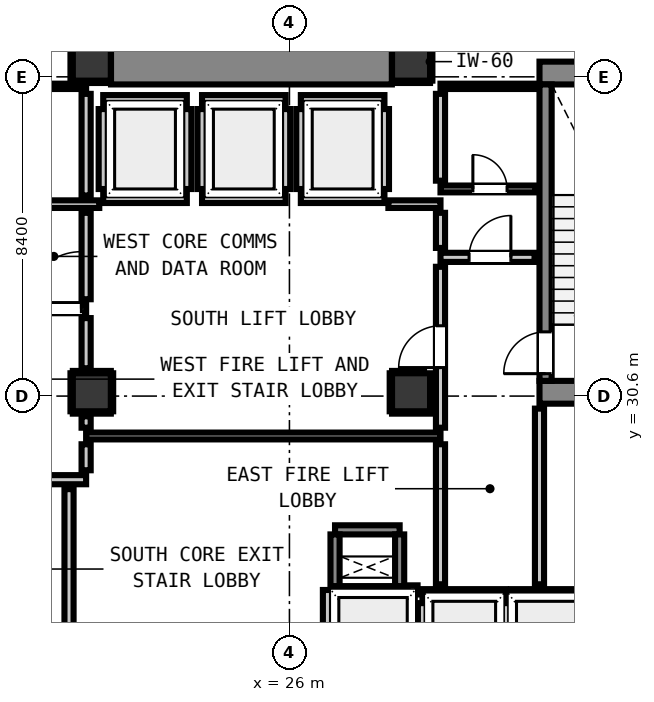
"""IFC4 building model, lengths in metres.
Left out: names, types, materials, properties, quantities, classifications, styles, units other than length and angle.
Written with IfcOpenShell. Run it as: python <this file> out.ifc"""

import sys

from ifc_helpers import new_model, si_unit, direction, frame, frame_2d, origin, origin_2d, place, context, subcontext, project, spatial, rectangle, extrude, element, fill, save


model = new_model("IFC4")
c1 = context("Model", 3, precision=1e-05, world=origin(), true_north=direction((0.0, 1.0)))
c2 = subcontext(c1, "Body", "Model", "MODEL_VIEW")
j1 = project(units=[si_unit("LENGTHUNIT", "METRE"), si_unit("PLANEANGLEUNIT", "RADIAN")], contexts=[c1])
p1 = place(None, origin())
s1 = spatial("IfcSite", under=j1, at=p1, CompositionType="ELEMENT")
p2 = place(p1, origin())
s2 = spatial("IfcBuilding", under=s1, at=p2, CompositionType="ELEMENT")
p3 = place(p2, frame((0.0, 0.0, 5.2)))
s3 = spatial("IfcBuildingStorey", under=s2, at=p3, CompositionType="ELEMENT", Elevation=5.2)
for number, where, z_axis, x_axis in (
    (1, (20.8, 39.4, 0.0), (0.0, 0.0, 1.0), (1.0, 0.0, 0.0)),
    (2, (29.2, 39.4, 0.0), (0.0, 0.0, 1.0), (1.0, 0.0, 0.0)),
):
    element("IfcColumn", number, at=place(p3, frame(where, z_axis=z_axis, x_axis=x_axis)), inside=s3, PredefinedType="COLUMN", context=c2, shape_type="SweptSolid", body=[
        extrude(rectangle(XDim=1.0, YDim=1.0, at=origin_2d()), origin(), (0.0, 0.0, 1.0), 4.2),
    ])
p4 = place(p3, frame((32.58, 39.1, 0.0), z_axis=(0.0, 0.0, 1.0), x_axis=(1.0, 0.0, 0.0)))
e3 = element("IfcWall", 3, at=p4, inside=s3, PredefinedType="SHEAR", context=c2, shape_type="SweptSolid", body=[
    extrude(rectangle(XDim=4.08, YDim=0.6, at=frame_2d((2.04, 0.0))), origin(), (0.0, 0.0, 1.0), 4.2),
])
p5 = place(p3, frame((32.58, 30.7, 0.0), z_axis=(0.0, 0.0, 1.0), x_axis=(1.0, 0.0, 0.0)))
e4 = element("IfcWall", 4, at=p5, inside=s3, PredefinedType="SHEAR", context=c2, shape_type="SweptSolid", body=[
    extrude(rectangle(XDim=3.415, YDim=0.6, at=frame_2d((1.708, 0.0))), origin(), (0.0, 0.0, 1.0), 4.2),
])
p6 = place(p3, frame((21.305, 39.4, 0.0), z_axis=(0.0, 0.0, 1.0), x_axis=(1.0, 0.0, 0.0)))
e5 = element("IfcWall", 5, at=p6, inside=s3, PredefinedType="SHEAR", context=c2, shape_type="SweptSolid", body=[
    extrude(rectangle(XDim=7.39, YDim=1.2, at=frame_2d((3.695, 0.0))), origin(), (0.0, 0.0, 1.0), 4.2),
])
p7 = place(p3, frame((32.74, 31.0, 0.0), z_axis=(0.0, 0.0, 1.0), x_axis=(0.0, 1.0, 0.0)))
e6 = element("IfcWall", 6, at=p7, inside=s3, PredefinedType="SHEAR", context=c2, shape_type="SweptSolid", body=[
    extrude(rectangle(XDim=7.8, YDim=0.32, at=frame_2d((3.9, 0.0))), origin(), (0.0, 0.0, 1.0), 4.2),
])
p8 = place(p7, frame((0.19, 0.0, 0.0)))
e7 = element("IfcOpeningElement", 7, at=p8, cuts=e6, PredefinedType="OPENING", context=c2, shape_type="SweptSolid", body=[
    extrude(rectangle(XDim=1.1, YDim=2.15, at=frame_2d((0.55, 1.075))), frame((0.0, 0.17, 0.0), z_axis=(0.0, -1.0, 0.0), x_axis=(1.0, 0.0, 0.0)), (0.0, 0.0, 1.0), 0.34),
])
for number, where, z_axis, x_axis in (
    (8, (27.2, 25.48, 0.0), (0.0, 0.0, 1.0), (1.0, 0.0, 0.0)),
    (9, (27.2, 27.08, 0.0), (0.0, 0.0, 1.0), (1.0, 0.0, 0.0)),
):
    element("IfcWall", number, at=place(p3, frame(where, z_axis=z_axis, x_axis=x_axis)), inside=s3, PredefinedType="SHEAR", context=c2, shape_type="SweptSolid", body=[
        extrude(rectangle(XDim=1.7, YDim=0.24, at=frame_2d((0.85, 0.0))), origin(), (0.0, 0.0, 1.0), 4.2),
    ])
for number, where, z_axis, x_axis in (
    (10, (27.2, 25.6, 0.0), (0.0, 0.0, 1.0), (0.0, 1.0, 0.0)),
    (11, (28.9, 25.6, 0.0), (0.0, 0.0, 1.0), (0.0, 1.0, 0.0)),
):
    element("IfcWall", number, at=place(p3, frame(where, z_axis=z_axis, x_axis=x_axis)), inside=s3, PredefinedType="SHEAR", context=c2, shape_type="SweptSolid", body=[
        extrude(rectangle(XDim=1.36, YDim=0.24, at=frame_2d((0.68, 0.0))), origin(), (0.0, 0.0, 1.0), 4.2),
    ])
for number, where, z_axis, x_axis in (
    (12, (20.8, 30.7, 0.0), (0.0, 0.0, 1.0), (1.0, 0.0, 0.0)),
    (13, (29.2, 30.7, 0.0), (0.0, 0.0, 1.0), (1.0, 0.0, 0.0)),
):
    element("IfcColumn", number, at=place(p3, frame(where, z_axis=z_axis, x_axis=x_axis)), inside=s3, PredefinedType="COLUMN", context=c2, shape_type="SweptSolid", body=[
        extrude(rectangle(XDim=1.0, YDim=1.0, at=origin_2d()), origin(), (0.0, 0.0, 1.0), 4.2),
    ])
for number, where, z_axis, x_axis in (
    (14, (21.1, 35.8, 0.0), (0.0, 0.0, 1.0), (1.0, 0.0, 0.0)),
    (15, (21.1, 38.4, 0.0), (0.0, 0.0, 1.0), (1.0, 0.0, 0.0)),
):
    element("IfcWall", number, at=place(p3, frame(where, z_axis=z_axis, x_axis=x_axis)), inside=s3, PredefinedType="PARTITIONING", context=c2, shape_type="SweptSolid", body=[
        extrude(rectangle(XDim=2.2, YDim=0.24, at=frame_2d((1.1, 0.0))), origin(), (0.0, 0.0, 1.0), 3.92),
    ])
p9 = place(p3, frame((21.1, 36.048, 0.0), z_axis=(0.0, 0.0, 1.0), x_axis=(0.0, 1.0, 0.0)))
e16 = element("IfcWall", 16, at=p9, inside=s3, PredefinedType="PARTITIONING", context=c2, shape_type="SweptSolid", body=[
    extrude(rectangle(XDim=2.104, YDim=0.24, at=frame_2d((1.052, 0.0))), origin(), (0.0, 0.0, 1.0), 2.955),
])
p10 = place(p3, frame((23.3, 36.048, 0.0), z_axis=(0.0, 0.0, 1.0), x_axis=(0.0, 1.0, 0.0)))
e17 = element("IfcWall", 17, at=p10, inside=s3, PredefinedType="PARTITIONING", context=c2, shape_type="SweptSolid", body=[
    extrude(rectangle(XDim=2.104, YDim=0.24, at=frame_2d((1.052, 0.0))), origin(), (0.0, 0.0, 1.0), 3.92),
])
for number, where, z_axis, x_axis in (
    (18, (23.7, 35.8, 0.0), (0.0, 0.0, 1.0), (1.0, 0.0, 0.0)),
    (19, (23.7, 38.4, 0.0), (0.0, 0.0, 1.0), (1.0, 0.0, 0.0)),
):
    element("IfcWall", number, at=place(p3, frame(where, z_axis=z_axis, x_axis=x_axis)), inside=s3, PredefinedType="PARTITIONING", context=c2, shape_type="SweptSolid", body=[
        extrude(rectangle(XDim=2.2, YDim=0.24, at=frame_2d((1.1, 0.0))), origin(), (0.0, 0.0, 1.0), 3.92),
    ])
for number, where, z_axis, x_axis in (
    (20, (23.7, 36.048, 0.0), (0.0, 0.0, 1.0), (0.0, 1.0, 0.0)),
    (21, (25.9, 36.048, 0.0), (0.0, 0.0, 1.0), (0.0, 1.0, 0.0)),
):
    element("IfcWall", number, at=place(p3, frame(where, z_axis=z_axis, x_axis=x_axis)), inside=s3, PredefinedType="PARTITIONING", context=c2, shape_type="SweptSolid", body=[
        extrude(rectangle(XDim=2.104, YDim=0.24, at=frame_2d((1.052, 0.0))), origin(), (0.0, 0.0, 1.0), 3.92),
    ])
for number, where, z_axis, x_axis in (
    (22, (26.3, 35.8, 0.0), (0.0, 0.0, 1.0), (1.0, 0.0, 0.0)),
    (23, (26.3, 38.4, 0.0), (0.0, 0.0, 1.0), (1.0, 0.0, 0.0)),
):
    element("IfcWall", number, at=place(p3, frame(where, z_axis=z_axis, x_axis=x_axis)), inside=s3, PredefinedType="PARTITIONING", context=c2, shape_type="SweptSolid", body=[
        extrude(rectangle(XDim=2.2, YDim=0.24, at=frame_2d((1.1, 0.0))), origin(), (0.0, 0.0, 1.0), 3.92),
    ])
for number, where, z_axis, x_axis in (
    (24, (26.3, 36.048, 0.0), (0.0, 0.0, 1.0), (0.0, 1.0, 0.0)),
    (25, (28.5, 36.048, 0.0), (0.0, 0.0, 1.0), (0.0, 1.0, 0.0)),
):
    element("IfcWall", number, at=place(p3, frame(where, z_axis=z_axis, x_axis=x_axis)), inside=s3, PredefinedType="PARTITIONING", context=c2, shape_type="SweptSolid", body=[
        extrude(rectangle(XDim=2.104, YDim=0.24, at=frame_2d((1.052, 0.0))), origin(), (0.0, 0.0, 1.0), 3.92),
    ])
p11 = place(p3, frame((29.5, 25.4, 0.0), z_axis=(0.0, 0.0, 1.0), x_axis=(1.0, 0.0, 0.0)))
e26 = element("IfcWall", 26, at=p11, inside=s3, PredefinedType="PARTITIONING", context=c2, shape_type="SweptSolid", body=[
    extrude(rectangle(XDim=2.2, YDim=0.24, at=frame_2d((1.1, 0.0))), origin(), (0.0, 0.0, 1.0), 3.92),
])
p12 = place(p3, frame((29.5, 22.632, 0.0), z_axis=(0.0, 0.0, 1.0), x_axis=(0.0, 1.0, 0.0)))
e27 = element("IfcWall", 27, at=p12, inside=s3, PredefinedType="PARTITIONING", context=c2, shape_type="SweptSolid", body=[
    extrude(rectangle(XDim=2.52, YDim=0.24, at=frame_2d((1.26, 0.0))), origin(), (0.0, 0.0, 1.0), 2.955),
])
p13 = place(p3, frame((31.7, 22.73, 0.0), z_axis=(0.0, 0.0, 1.0), x_axis=(0.0, 1.0, 0.0)))
e28 = element("IfcWall", 28, at=p13, inside=s3, PredefinedType="PARTITIONING", context=c2, shape_type="SweptSolid", body=[
    extrude(rectangle(XDim=2.422, YDim=0.24, at=frame_2d((1.211, 0.0))), origin(), (0.0, 0.0, 1.0), 3.92),
])
p14 = place(p3, frame((31.828, 25.4, 0.0), z_axis=(0.0, 0.0, 1.0), x_axis=(1.0, 0.0, 0.0)))
e29 = element("IfcWall", 29, at=p14, inside=s3, PredefinedType="PARTITIONING", context=c2, shape_type="SweptSolid", body=[
    extrude(rectangle(XDim=2.072, YDim=0.24, at=frame_2d((1.036, 0.0))), origin(), (0.0, 0.0, 1.0), 3.92),
])
p15 = place(p3, frame((29.103, 25.5, 0.0), z_axis=(0.0, 0.0, 1.0), x_axis=(1.0, 0.0, 0.0)))
e30 = element("IfcWall", 30, at=p15, inside=s3, PredefinedType="PARTITIONING", context=c2, shape_type="SweptSolid", body=[
    extrude(rectangle(XDim=0.269, YDim=0.24, at=frame_2d((0.135, 0.0))), origin(), (0.0, 0.0, 1.0), 3.92),
])
p16 = place(p3, frame((27.0, 22.73, 0.0), z_axis=(0.0, 0.0, 1.0), x_axis=(0.0, 1.0, 0.0)))
e31 = element("IfcWall", 31, at=p16, inside=s3, PredefinedType="PARTITIONING", context=c2, shape_type="SweptSolid", body=[
    extrude(rectangle(XDim=2.768, YDim=0.24, at=frame_2d((1.384, 0.0))), origin(), (0.0, 0.0, 1.0), 3.92),
])
p17 = place(p3, frame((17.45, 28.4, 0.0), z_axis=(0.0, 0.0, 1.0), x_axis=(1.0, 0.0, 0.0)))
e32 = element("IfcWall", 32, at=p17, inside=s3, PredefinedType="PARTITIONING", context=c2, shape_type="SweptSolid", body=[
    extrude(rectangle(XDim=3.2, YDim=0.24, at=frame_2d((1.6, 0.0))), origin(), (0.0, 0.0, 1.0), 3.92),
])
p18 = place(p17, frame((0.784, 0.0, 0.0)))
e33 = element("IfcOpeningElement", 33, at=p18, cuts=e32, PredefinedType="OPENING", context=c2, shape_type="SweptSolid", body=[
    extrude(rectangle(XDim=1.1, YDim=2.15, at=frame_2d((0.55, 1.075))), frame((0.0, 0.13, 0.0), z_axis=(0.0, -1.0, 0.0), x_axis=(1.0, 0.0, 0.0)), (0.0, 0.0, 1.0), 0.26),
])
p19 = place(p3, frame((17.45, 32.9, 0.0), z_axis=(0.0, 0.0, 1.0), x_axis=(1.0, 0.0, 0.0)))
e34 = element("IfcWall", 34, at=p19, inside=s3, PredefinedType="PARTITIONING", context=c2, shape_type="SweptSolid", body=[
    extrude(rectangle(XDim=3.2, YDim=0.24, at=frame_2d((1.6, 0.0))), origin(), (0.0, 0.0, 1.0), 3.92),
])
p20 = place(p19, frame((0.159, 0.0, 0.0)))
e35 = element("IfcOpeningElement", 35, at=p20, cuts=e34, PredefinedType="OPENING", context=c2, shape_type="SweptSolid", body=[
    extrude(rectangle(XDim=1.1, YDim=2.15, at=frame_2d((0.55, 1.075))), frame((0.0, 0.13, 0.0), z_axis=(0.0, -1.0, 0.0), x_axis=(1.0, 0.0, 0.0)), (0.0, 0.0, 1.0), 0.26),
])
p21 = place(p19, frame((1.576, 0.0, 0.0)))
e36 = element("IfcOpeningElement", 36, at=p21, cuts=e34, PredefinedType="OPENING", context=c2, shape_type="SweptSolid", body=[
    extrude(rectangle(XDim=1.5, YDim=2.15, at=frame_2d((0.75, 1.075))), frame((0.0, 0.13, 0.0), z_axis=(0.0, -1.0, 0.0), x_axis=(1.0, 0.0, 0.0)), (0.0, 0.0, 1.0), 0.26),
])
p22 = place(p3, frame((29.975, 34.25, 0.0), z_axis=(0.0, 0.0, 1.0), x_axis=(1.0, 0.0, 0.0)))
e37 = element("IfcWall", 37, at=p22, inside=s3, PredefinedType="PARTITIONING", context=c2, shape_type="SweptSolid", body=[
    extrude(rectangle(XDim=2.475, YDim=0.24, at=frame_2d((1.237, 0.0))), origin(), (0.0, 0.0, 1.0), 3.92),
])
p23 = place(p22, frame((0.752, 0.0, 0.0)))
e38 = element("IfcOpeningElement", 38, at=p23, cuts=e37, PredefinedType="OPENING", context=c2, shape_type="SweptSolid", body=[
    extrude(rectangle(XDim=1.1, YDim=2.15, at=frame_2d((0.55, 1.075))), frame((0.0, 0.13, 0.0), z_axis=(0.0, -1.0, 0.0), x_axis=(1.0, 0.0, 0.0)), (0.0, 0.0, 1.0), 0.26),
])
p24 = place(p3, frame((18.95, 35.65, 0.0), z_axis=(0.0, 0.0, 1.0), x_axis=(1.0, 0.0, 0.0)))
e39 = element("IfcWall", 39, at=p24, inside=s3, PredefinedType="PARTITIONING", context=c2, shape_type="SweptSolid", body=[
    extrude(rectangle(XDim=2.046, YDim=0.2, at=frame_2d((1.023, 0.0))), origin(), (0.0, 0.0, 1.0), 3.92),
])
p25 = place(p3, frame((28.604, 35.65, 0.0), z_axis=(0.0, 0.0, 1.0), x_axis=(1.0, 0.0, 0.0)))
e40 = element("IfcWall", 40, at=p25, inside=s3, PredefinedType="PARTITIONING", context=c2, shape_type="SweptSolid", body=[
    extrude(rectangle(XDim=1.371, YDim=0.2, at=frame_2d((0.686, 0.0))), origin(), (0.0, 0.0, 1.0), 3.92),
])
p26 = place(p3, frame((20.65, 29.55, 0.0), z_axis=(0.0, 0.0, 1.0), x_axis=(1.0, 0.0, 0.0)))
e41 = element("IfcWall", 41, at=p26, inside=s3, PredefinedType="PARTITIONING", context=c2, shape_type="SweptSolid", body=[
    extrude(rectangle(XDim=9.325, YDim=0.18, at=frame_2d((4.663, 0.0))), origin(), (0.0, 0.0, 1.0), 3.92),
])
p27 = place(p3, frame((29.975, 36.05, 0.0), z_axis=(0.0, 0.0, 1.0), x_axis=(1.0, 0.0, 0.0)))
e42 = element("IfcWall", 42, at=p27, inside=s3, PredefinedType="PARTITIONING", context=c2, shape_type="SweptSolid", body=[
    extrude(rectangle(XDim=2.505, YDim=0.18, at=frame_2d((1.252, 0.0))), origin(), (0.0, 0.0, 1.0), 3.92),
])
p28 = place(p27, frame((0.852, 0.0, 0.0)))
e43 = element("IfcOpeningElement", 43, at=p28, cuts=e42, PredefinedType="OPENING", context=c2, shape_type="SweptSolid", body=[
    extrude(rectangle(XDim=0.9, YDim=2.1, at=frame_2d((0.45, 1.05))), frame((0.0, 0.1, 0.0), z_axis=(0.0, -1.0, 0.0), x_axis=(1.0, 0.0, 0.0)), (0.0, 0.0, 1.0), 0.2),
])
p29 = place(p3, frame((18.95, 38.75, 0.0), z_axis=(0.0, 0.0, 1.0), x_axis=(1.0, 0.0, 0.0)))
e44 = element("IfcWall", 44, at=p29, inside=s3, PredefinedType="PARTITIONING", context=c2, shape_type="SweptSolid", body=[
    extrude(rectangle(XDim=1.7, YDim=0.14, at=frame_2d((0.85, 0.0))), origin(), (0.0, 0.0, 1.0), 3.92),
])
p30 = place(p3, frame((29.975, 38.75, 0.0), z_axis=(0.0, 0.0, 1.0), x_axis=(1.0, 0.0, 0.0)))
e45 = element("IfcWall", 45, at=p30, inside=s3, PredefinedType="PARTITIONING", context=c2, shape_type="SweptSolid", body=[
    extrude(rectangle(XDim=2.525, YDim=0.14, at=frame_2d((1.262, 0.0))), origin(), (0.0, 0.0, 1.0), 3.92),
])
p31 = place(p3, frame((20.2, 22.586, 0.0), z_axis=(0.0, 0.0, 1.0), x_axis=(0.0, 1.0, 0.0)))
e46 = element("IfcWall", 46, at=p31, inside=s3, PredefinedType="PARTITIONING", context=c2, shape_type="SweptSolid", body=[
    extrude(rectangle(XDim=5.566, YDim=0.24, at=frame_2d((2.783, 0.0))), origin(), (0.0, 0.0, 1.0), 3.92),
])
p32 = place(p3, frame((20.65, 28.648, 0.0), z_axis=(0.0, 0.0, 1.0), x_axis=(0.0, 1.0, 0.0)))
e47 = element("IfcWall", 47, at=p32, inside=s3, PredefinedType="PARTITIONING", context=c2, shape_type="SweptSolid", body=[
    extrude(rectangle(XDim=0.684, YDim=0.24, at=frame_2d((0.342, 0.0))), origin(), (0.0, 0.0, 1.0), 2.955),
])
p33 = place(p3, frame((20.65, 29.768, 0.0), z_axis=(0.0, 0.0, 1.0), x_axis=(0.0, 1.0, 0.0)))
e48 = element("IfcWall", 48, at=p33, inside=s3, PredefinedType="PARTITIONING", context=c2, shape_type="SweptSolid", body=[
    extrude(rectangle(XDim=0.3, YDim=0.24, at=frame_2d((0.15, 0.0))), origin(), (0.0, 0.0, 1.0), 2.955),
])
p34 = place(p3, frame((20.65, 31.332, 0.0), z_axis=(0.0, 0.0, 1.0), x_axis=(0.0, 1.0, 0.0)))
e49 = element("IfcWall", 49, at=p34, inside=s3, PredefinedType="PARTITIONING", context=c2, shape_type="SweptSolid", body=[
    extrude(rectangle(XDim=1.32, YDim=0.24, at=frame_2d((0.66, 0.0))), origin(), (0.0, 0.0, 1.0), 2.955),
])
p35 = place(p3, frame((20.65, 33.148, 0.0), z_axis=(0.0, 0.0, 1.0), x_axis=(0.0, 1.0, 0.0)))
e50 = element("IfcWall", 50, at=p35, inside=s3, PredefinedType="PARTITIONING", context=c2, shape_type="SweptSolid", body=[
    extrude(rectangle(XDim=2.274, YDim=0.24, at=frame_2d((1.137, 0.0))), origin(), (0.0, 0.0, 1.0), 2.955),
])
p36 = place(p3, frame((20.65, 35.878, 0.0), z_axis=(0.0, 0.0, 1.0), x_axis=(0.0, 1.0, 0.0)))
e51 = element("IfcWall", 51, at=p36, inside=s3, PredefinedType="PARTITIONING", context=c2, shape_type="SweptSolid", body=[
    extrude(rectangle(XDim=2.674, YDim=0.24, at=frame_2d((1.337, 0.0))), origin(), (0.0, 0.0, 1.0), 2.955),
])
p37 = place(p3, frame((29.975, 25.648, 0.0), z_axis=(0.0, 0.0, 1.0), x_axis=(0.0, 1.0, 0.0)))
e52 = element("IfcWall", 52, at=p37, inside=s3, PredefinedType="PARTITIONING", context=c2, shape_type="SweptSolid", body=[
    extrude(rectangle(XDim=3.684, YDim=0.24, at=frame_2d((1.842, 0.0))), origin(), (0.0, 0.0, 1.0), 3.92),
])
p38 = place(p3, frame((29.975, 29.768, 0.0), z_axis=(0.0, 0.0, 1.0), x_axis=(0.0, 1.0, 0.0)))
e53 = element("IfcWall", 53, at=p38, inside=s3, PredefinedType="PARTITIONING", context=c2, shape_type="SweptSolid", body=[
    extrude(rectangle(XDim=4.234, YDim=0.24, at=frame_2d((2.117, 0.0))), origin(), (0.0, 0.0, 1.0), 3.92),
])
p39 = place(p38, frame((1.582, 0.0, 0.0)))
e54 = element("IfcOpeningElement", 54, at=p39, cuts=e53, PredefinedType="OPENING", context=c2, shape_type="SweptSolid", body=[
    extrude(rectangle(XDim=1.1, YDim=2.15, at=frame_2d((0.55, 1.075))), frame((0.0, 0.13, 0.0), z_axis=(0.0, -1.0, 0.0), x_axis=(1.0, 0.0, 0.0)), (0.0, 0.0, 1.0), 0.26),
])
p40 = place(p3, frame((29.975, 34.498, 0.0), z_axis=(0.0, 0.0, 1.0), x_axis=(0.0, 1.0, 0.0)))
e55 = element("IfcWall", 55, at=p40, inside=s3, PredefinedType="PARTITIONING", context=c2, shape_type="SweptSolid", body=[
    extrude(rectangle(XDim=0.924, YDim=0.24, at=frame_2d((0.462, 0.0))), origin(), (0.0, 0.0, 1.0), 3.92),
])
p41 = place(p3, frame((29.975, 36.268, 0.0), z_axis=(0.0, 0.0, 1.0), x_axis=(0.0, 1.0, 0.0)))
e56 = element("IfcWall", 56, at=p41, inside=s3, PredefinedType="PARTITIONING", context=c2, shape_type="SweptSolid", body=[
    extrude(rectangle(XDim=2.284, YDim=0.24, at=frame_2d((1.142, 0.0))), origin(), (0.0, 0.0, 1.0), 3.92),
])
p42 = place(p3, frame((32.58, 25.648, 0.0), z_axis=(0.0, 0.0, 1.0), x_axis=(0.0, 1.0, 0.0)))
e57 = element("IfcWall", 57, at=p42, inside=s3, PredefinedType="PARTITIONING", context=c2, shape_type="SweptSolid", body=[
    extrude(rectangle(XDim=4.622, YDim=0.24, at=frame_2d((2.311, 0.0))), origin(), (0.0, 0.0, 1.0), 3.92),
])
p43 = place(p3, frame((20.3, 38.868, 0.0), z_axis=(0.0, 0.0, 1.0), x_axis=(1.0, 0.0, 0.0)))
e58 = element("IfcWall", 58, at=p43, inside=s3, PredefinedType="PARTITIONING", context=c2, shape_type="SweptSolid", body=[
    extrude(rectangle(XDim=0.99, YDim=0.06, at=frame_2d((0.495, 0.0))), origin(), (0.0, 0.0, 1.0), 1.45),
])
p44 = place(p3, frame((20.268, 38.9, 0.0), z_axis=(0.0, 0.0, 1.0), x_axis=(0.0, 1.0, 0.0)))
e59 = element("IfcWall", 59, at=p44, inside=s3, PredefinedType="PARTITIONING", context=c2, shape_type="SweptSolid", body=[
    extrude(rectangle(XDim=1.0, YDim=0.06, at=frame_2d((0.5, 0.0))), origin(), (0.0, 0.0, 1.0), 1.45),
])
p45 = place(p3, frame((28.71, 38.868, 0.0), z_axis=(0.0, 0.0, 1.0), x_axis=(1.0, 0.0, 0.0)))
e60 = element("IfcWall", 60, at=p45, inside=s3, PredefinedType="PARTITIONING", context=c2, shape_type="SweptSolid", body=[
    extrude(rectangle(XDim=0.99, YDim=0.06, at=frame_2d((0.495, 0.0))), origin(), (0.0, 0.0, 1.0), 1.45),
])
for number, where, z_axis, x_axis in (
    (61, (29.732, 38.9, 0.0), (0.0, 0.0, 1.0), (0.0, 1.0, 0.0)),
    (62, (20.3, 30.168, 0.0), (0.0, 0.0, 1.0), (1.0, 0.0, 0.0)),
    (63, (20.3, 31.232, 0.0), (0.0, 0.0, 1.0), (1.0, 0.0, 0.0)),
    (64, (20.268, 30.2, 0.0), (0.0, 0.0, 1.0), (0.0, 1.0, 0.0)),
    (65, (21.332, 30.2, 0.0), (0.0, 0.0, 1.0), (0.0, 1.0, 0.0)),
    (66, (28.7, 30.168, 0.0), (0.0, 0.0, 1.0), (1.0, 0.0, 0.0)),
):
    element("IfcWall", number, at=place(p3, frame(where, z_axis=z_axis, x_axis=x_axis)), inside=s3, PredefinedType="PARTITIONING", context=c2, shape_type="SweptSolid", body=[
        extrude(rectangle(XDim=1.0, YDim=0.06, at=frame_2d((0.5, 0.0))), origin(), (0.0, 0.0, 1.0), 1.45),
    ])
p46 = place(p3, frame((28.7, 31.232, 0.0), z_axis=(0.0, 0.0, 1.0), x_axis=(1.0, 0.0, 0.0)))
e67 = element("IfcWall", 67, at=p46, inside=s3, PredefinedType="PARTITIONING", context=c2, shape_type="SweptSolid", body=[
    extrude(rectangle(XDim=0.841, YDim=0.06, at=frame_2d((0.42, 0.0))), origin(), (0.0, 0.0, 1.0), 1.45),
])
p47 = place(p3, frame((28.668, 30.2, 0.0), z_axis=(0.0, 0.0, 1.0), x_axis=(0.0, 1.0, 0.0)))
e68 = element("IfcWall", 68, at=p47, inside=s3, PredefinedType="PARTITIONING", context=c2, shape_type="SweptSolid", body=[
    extrude(rectangle(XDim=1.0, YDim=0.06, at=frame_2d((0.5, 0.0))), origin(), (0.0, 0.0, 1.0), 1.45),
])
p48 = place(p3, frame((29.732, 30.2, 0.0), z_axis=(0.0, 0.0, 1.0), x_axis=(0.0, 1.0, 0.0)))
e69 = element("IfcWall", 69, at=p48, inside=s3, PredefinedType="PARTITIONING", context=c2, shape_type="SweptSolid", body=[
    extrude(rectangle(XDim=0.772, YDim=0.06, at=frame_2d((0.386, 0.0))), origin(), (0.0, 0.0, 1.0), 1.45),
])
p49 = place(p8, origin())
e70 = element("IfcDoor", 70, at=p49, inside=s3, OperationType="SINGLE_SWING_LEFT", PredefinedType="DOOR", context=c2, shape_type="SweptSolid", body=[
    extrude(rectangle(XDim=1.1, YDim=2.15, at=frame_2d((0.55, 1.075))), frame((0.0, 0.025, 0.0), z_axis=(0.0, -1.0, 0.0), x_axis=(1.0, 0.0, 0.0)), (0.0, 0.0, 1.0), 0.05),
])
fill(e7, e70)
p50 = place(p39, origin())
e71 = element("IfcDoor", 71, at=p50, inside=s3, OperationType="SINGLE_SWING_LEFT", PredefinedType="DOOR", context=c2, shape_type="SweptSolid", body=[
    extrude(rectangle(XDim=1.1, YDim=2.15, at=frame_2d((0.55, 1.075))), frame((0.0, 0.025, 0.0), z_axis=(0.0, -1.0, 0.0), x_axis=(1.0, 0.0, 0.0)), (0.0, 0.0, 1.0), 0.05),
])
fill(e54, e71)
p51 = place(p23, origin())
e72 = element("IfcDoor", 72, at=p51, inside=s3, OperationType="SINGLE_SWING_RIGHT", PredefinedType="DOOR", context=c2, shape_type="SweptSolid", body=[
    extrude(rectangle(XDim=1.1, YDim=2.15, at=frame_2d((0.55, 1.075))), frame((0.0, 0.025, 0.0), z_axis=(0.0, -1.0, 0.0), x_axis=(1.0, 0.0, 0.0)), (0.0, 0.0, 1.0), 0.05),
])
fill(e38, e72)
p52 = place(p21, origin())
e73 = element("IfcDoor", 73, at=p52, inside=s3, OperationType="SINGLE_SWING_RIGHT", PredefinedType="DOOR", context=c2, shape_type="SweptSolid", body=[
    extrude(rectangle(XDim=1.5, YDim=2.15, at=frame_2d((0.75, 1.075))), frame((0.0, 0.025, 0.0), z_axis=(0.0, -1.0, 0.0), x_axis=(1.0, 0.0, 0.0)), (0.0, 0.0, 1.0), 0.05),
])
fill(e36, e73)
p53 = place(p28, origin())
e74 = element("IfcDoor", 74, at=p53, inside=s3, OperationType="SINGLE_SWING_LEFT", PredefinedType="DOOR", context=c2, shape_type="SweptSolid", body=[
    extrude(rectangle(XDim=0.9, YDim=2.1, at=frame_2d((0.45, 1.05))), frame((0.0, 0.025, 0.0), z_axis=(0.0, -1.0, 0.0), x_axis=(1.0, 0.0, 0.0)), (0.0, 0.0, 1.0), 0.05),
])
fill(e43, e74)
save(model, sys.argv[1])
